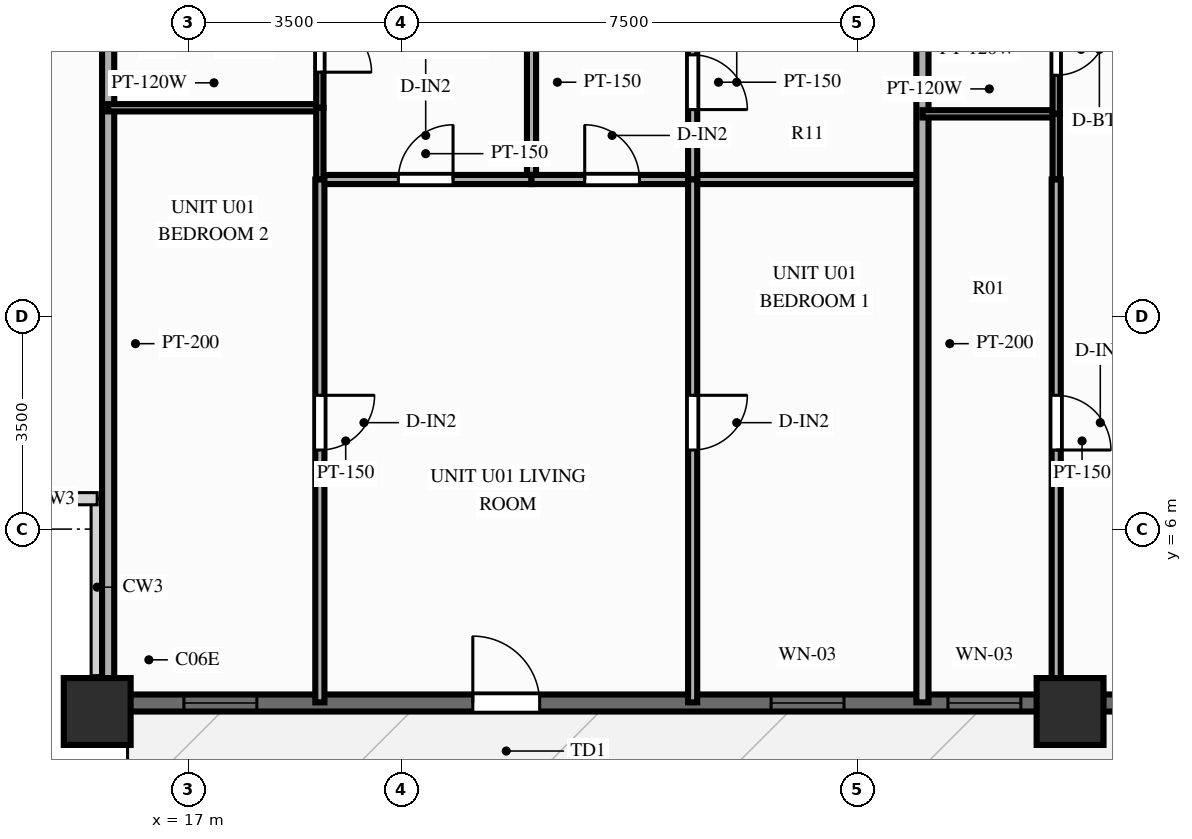
"""IFC4 building model, lengths in metres.
Left out: names, types, materials, properties, quantities, classifications, styles, units other than length and angle.
Written with IfcOpenShell. Run it as: python <this file> out.ifc"""

import sys

from ifc_helpers import new_model, si_unit, direction, frame, frame_2d, origin, origin_2d, place, context, subcontext, project, spatial, rectangle, extrude, source, transform, mapped, element, fill, save


model = new_model("IFC4")
c1 = context("Model", 3, precision=1e-05, world=origin(), true_north=direction((0.0, 1.0)))
c2 = subcontext(c1, "Body", "Model", "MODEL_VIEW")
j1 = project(units=[si_unit("LENGTHUNIT", "METRE"), si_unit("PLANEANGLEUNIT", "RADIAN")], contexts=[c1])
p1 = place(None, origin())
s1 = spatial("IfcSite", under=j1, at=p1, CompositionType="ELEMENT")
p2 = place(p1, origin())
s2 = spatial("IfcBuilding", under=s1, at=p2, CompositionType="ELEMENT")
p3 = place(p2, frame((0.0, 0.0, 61.4)))
s3 = spatial("IfcBuildingStorey", under=s2, at=p3, CompositionType="ELEMENT", Elevation=61.4)
m1 = source(origin(), c2, "Body", "SweptSolid", [
    extrude(rectangle(XDim=1.1, YDim=1.1, at=origin_2d()), origin(), (0.0, 0.0, 1.0), 3.0),
])
for number, where, z_axis, x_axis in (
    (1, (15.5, 3.0, 0.0), (0.0, 0.0, 1.0), (1.0, 0.0, 0.0)),
    (2, (31.5, 3.0, 0.0), (0.0, 0.0, 1.0), (1.0, 0.0, 0.0)),
):
    element("IfcColumn", number, at=place(p3, frame(where, z_axis=z_axis, x_axis=x_axis)), inside=s3, PredefinedType="COLUMN", context=c2, shape_type="MappedRepresentation", body=[
        mapped(m1, transform((0.0, 0.0, 0.0), scale=1.0)),
    ])
p4 = place(p3, frame((15.5, 3.14, 0.0), z_axis=(0.0, 0.0, 1.0), x_axis=(1.0, 0.0, 0.0)))
e3 = element("IfcWall", 3, at=p4, inside=s3, PredefinedType="SOLIDWALL", context=c2, shape_type="SweptSolid", body=[
    extrude(rectangle(XDim=45.0, YDim=0.28, at=frame_2d((22.5, 0.0))), origin(), (0.0, 0.0, 1.0), 2.28),
])
p5 = place(p4, frame((1.426, 0.0, 0.25)))
e4 = element("IfcOpeningElement", 4, at=p5, cuts=e3, PredefinedType="OPENING", context=c2, shape_type="SweptSolid", body=[
    extrude(rectangle(XDim=1.2, YDim=1.5, at=frame_2d((0.6, 0.75))), frame((0.0, 0.152, 0.0), z_axis=(0.0, -1.0, 0.0), x_axis=(1.0, 0.0, 0.0)), (0.0, 0.0, 1.0), 0.304),
])
p6 = place(p4, frame((7.278, 0.0, 0.0), z_axis=(0.0, 0.0, 1.0), x_axis=(-1.0, 0.0, 0.0)))
e5 = element("IfcOpeningElement", 5, at=p6, cuts=e3, PredefinedType="OPENING", context=c2, shape_type="SweptSolid", body=[
    extrude(rectangle(XDim=1.1, YDim=2.15, at=frame_2d((0.55, 1.075))), frame((0.0, 0.152, 0.0), z_axis=(0.0, -1.0, 0.0), x_axis=(1.0, 0.0, 0.0)), (0.0, 0.0, 1.0), 0.304),
])
p7 = place(p4, frame((11.083, 0.0, 0.25)))
e6 = element("IfcOpeningElement", 6, at=p7, cuts=e3, PredefinedType="OPENING", context=c2, shape_type="SweptSolid", body=[
    extrude(rectangle(XDim=1.2, YDim=1.5, at=frame_2d((0.6, 0.75))), frame((0.0, 0.152, 0.0), z_axis=(0.0, -1.0, 0.0), x_axis=(1.0, 0.0, 0.0)), (0.0, 0.0, 1.0), 0.304),
])
p8 = place(p4, frame((13.991, 0.0, 0.25)))
e7 = element("IfcOpeningElement", 7, at=p8, cuts=e3, PredefinedType="OPENING", context=c2, shape_type="SweptSolid", body=[
    extrude(rectangle(XDim=1.2, YDim=1.5, at=frame_2d((0.6, 0.75))), frame((0.0, 0.152, 0.0), z_axis=(0.0, -1.0, 0.0), x_axis=(1.0, 0.0, 0.0)), (0.0, 0.0, 1.0), 0.304),
])
p9 = place(p4, frame((16.858, 0.0, 0.25)))
e8 = element("IfcOpeningElement", 8, at=p9, cuts=e3, PredefinedType="OPENING", context=c2, shape_type="SweptSolid", body=[
    extrude(rectangle(XDim=0.95, YDim=1.5, at=frame_2d((0.475, 0.75))), frame((0.0, 0.152, 0.0), z_axis=(0.0, -1.0, 0.0), x_axis=(1.0, 0.0, 0.0)), (0.0, 0.0, 1.0), 0.304),
])
p10 = place(p4, frame((19.119, 0.0, 0.25)))
e9 = element("IfcOpeningElement", 9, at=p10, cuts=e3, PredefinedType="OPENING", context=c2, shape_type="SweptSolid", body=[
    extrude(rectangle(XDim=1.2, YDim=1.5, at=frame_2d((0.6, 0.75))), frame((0.0, 0.152, 0.0), z_axis=(0.0, -1.0, 0.0), x_axis=(1.0, 0.0, 0.0)), (0.0, 0.0, 1.0), 0.304),
])
p11 = place(p4, frame((21.661, 0.0, 0.25)))
e10 = element("IfcOpeningElement", 10, at=p11, cuts=e3, PredefinedType="OPENING", context=c2, shape_type="SweptSolid", body=[
    extrude(rectangle(XDim=1.2, YDim=1.5, at=frame_2d((0.6, 0.75))), frame((0.0, 0.152, 0.0), z_axis=(0.0, -1.0, 0.0), x_axis=(1.0, 0.0, 0.0)), (0.0, 0.0, 1.0), 0.304),
])
p12 = place(p4, frame((24.013, 0.0, 0.25)))
e11 = element("IfcOpeningElement", 11, at=p12, cuts=e3, PredefinedType="OPENING", context=c2, shape_type="SweptSolid", body=[
    extrude(rectangle(XDim=1.2, YDim=1.5, at=frame_2d((0.6, 0.75))), frame((0.0, 0.152, 0.0), z_axis=(0.0, -1.0, 0.0), x_axis=(1.0, 0.0, 0.0)), (0.0, 0.0, 1.0), 0.304),
])
p13 = place(p4, frame((26.638, 0.0, 0.25)))
e12 = element("IfcOpeningElement", 12, at=p13, cuts=e3, PredefinedType="OPENING", context=c2, shape_type="SweptSolid", body=[
    extrude(rectangle(XDim=1.2, YDim=1.5, at=frame_2d((0.6, 0.75))), frame((0.0, 0.152, 0.0), z_axis=(0.0, -1.0, 0.0), x_axis=(1.0, 0.0, 0.0)), (0.0, 0.0, 1.0), 0.304),
])
p14 = place(p4, frame((29.72, 0.0, 0.25)))
e13 = element("IfcOpeningElement", 13, at=p14, cuts=e3, PredefinedType="OPENING", context=c2, shape_type="SweptSolid", body=[
    extrude(rectangle(XDim=0.95, YDim=1.5, at=frame_2d((0.475, 0.75))), frame((0.0, 0.152, 0.0), z_axis=(0.0, -1.0, 0.0), x_axis=(1.0, 0.0, 0.0)), (0.0, 0.0, 1.0), 0.304),
])
p15 = place(p4, frame((31.765, 0.0, 0.25)))
e14 = element("IfcOpeningElement", 14, at=p15, cuts=e3, PredefinedType="OPENING", context=c2, shape_type="SweptSolid", body=[
    extrude(rectangle(XDim=1.2, YDim=1.5, at=frame_2d((0.6, 0.75))), frame((0.0, 0.152, 0.0), z_axis=(0.0, -1.0, 0.0), x_axis=(1.0, 0.0, 0.0)), (0.0, 0.0, 1.0), 0.304),
])
p16 = place(p4, frame((34.658, 0.0, 0.25)))
e15 = element("IfcOpeningElement", 15, at=p16, cuts=e3, PredefinedType="OPENING", context=c2, shape_type="SweptSolid", body=[
    extrude(rectangle(XDim=1.2, YDim=1.5, at=frame_2d((0.6, 0.75))), frame((0.0, 0.152, 0.0), z_axis=(0.0, -1.0, 0.0), x_axis=(1.0, 0.0, 0.0)), (0.0, 0.0, 1.0), 0.304),
])
p17 = place(p4, frame((37.31, 0.0, 0.25)))
e16 = element("IfcOpeningElement", 16, at=p17, cuts=e3, PredefinedType="OPENING", context=c2, shape_type="SweptSolid", body=[
    extrude(rectangle(XDim=1.2, YDim=1.5, at=frame_2d((0.6, 0.75))), frame((0.0, 0.152, 0.0), z_axis=(0.0, -1.0, 0.0), x_axis=(1.0, 0.0, 0.0)), (0.0, 0.0, 1.0), 0.304),
])
p18 = place(p4, frame((39.801, 0.0, 0.25)))
e17 = element("IfcOpeningElement", 17, at=p18, cuts=e3, PredefinedType="OPENING", context=c2, shape_type="SweptSolid", body=[
    extrude(rectangle(XDim=1.2, YDim=1.5, at=frame_2d((0.6, 0.75))), frame((0.0, 0.152, 0.0), z_axis=(0.0, -1.0, 0.0), x_axis=(1.0, 0.0, 0.0)), (0.0, 0.0, 1.0), 0.304),
])
p19 = place(p4, frame((42.588, 0.0, 0.25)))
e18 = element("IfcOpeningElement", 18, at=p19, cuts=e3, PredefinedType="OPENING", context=c2, shape_type="SweptSolid", body=[
    extrude(rectangle(XDim=1.2, YDim=1.5, at=frame_2d((0.6, 0.75))), frame((0.0, 0.152, 0.0), z_axis=(0.0, -1.0, 0.0), x_axis=(1.0, 0.0, 0.0)), (0.0, 0.0, 1.0), 0.304),
])
p20 = place(p3, frame((15.68, 14.95, 0.0), z_axis=(0.0, 0.0, 1.0), x_axis=(0.0, -1.0, 0.0)))
e19 = element("IfcWall", 19, at=p20, inside=s3, PredefinedType="PARTITIONING", context=c2, shape_type="SweptSolid", body=[
    extrude(rectangle(XDim=11.8, YDim=0.2, at=frame_2d((5.9, 0.0))), origin(), (0.0, 0.0, 1.0), 2.79),
])
p21 = place(p3, frame((22.643, 14.95, 0.0), z_axis=(0.0, 0.0, 1.0), x_axis=(0.0, -1.0, 0.0)))
e20 = element("IfcWall", 20, at=p21, inside=s3, PredefinedType="PARTITIONING", context=c2, shape_type="SweptSolid", body=[
    extrude(rectangle(XDim=3.2, YDim=0.15, at=frame_2d((1.6, 0.0))), origin(), (0.0, 0.0, 1.0), 2.79),
])
p22 = place(p3, frame((19.162, 11.75, 0.0), z_axis=(0.0, 0.0, 1.0), x_axis=(1.0, 0.0, 0.0)))
e21 = element("IfcWall", 21, at=p22, inside=s3, PredefinedType="PARTITIONING", context=c2, shape_type="SweptSolid", body=[
    extrude(rectangle(XDim=3.481, YDim=0.15, at=frame_2d((1.74, 0.0))), origin(), (0.0, 0.0, 1.0), 2.79),
])
p23 = place(p22, frame((1.291, 0.0, 0.0)))
e22 = element("IfcOpeningElement", 22, at=p23, cuts=e21, PredefinedType="OPENING", context=c2, shape_type="SweptSolid", body=[
    extrude(rectangle(XDim=0.9, YDim=2.1, at=frame_2d((0.45, 1.05))), frame((0.0, 0.087, 0.0), z_axis=(0.0, -1.0, 0.0), x_axis=(1.0, 0.0, 0.0)), (0.0, 0.0, 1.0), 0.174),
])
p24 = place(p3, frame((22.643, 11.75, 0.0), z_axis=(0.0, 0.0, 1.0), x_axis=(1.0, 0.0, 0.0)))
e23 = element("IfcWall", 23, at=p24, inside=s3, PredefinedType="PARTITIONING", context=c2, shape_type="SweptSolid", body=[
    extrude(rectangle(XDim=2.65, YDim=0.15, at=frame_2d((1.325, 0.0))), origin(), (0.0, 0.0, 1.0), 2.79),
])
p25 = place(p24, frame((0.875, 0.0, 0.0)))
e24 = element("IfcOpeningElement", 24, at=p25, cuts=e23, PredefinedType="OPENING", context=c2, shape_type="SweptSolid", body=[
    extrude(rectangle(XDim=0.9, YDim=2.1, at=frame_2d((0.45, 1.05))), frame((0.0, 0.087, 0.0), z_axis=(0.0, -1.0, 0.0), x_axis=(1.0, 0.0, 0.0)), (0.0, 0.0, 1.0), 0.174),
])
p26 = place(p3, frame((15.68, 12.93, 0.0), z_axis=(0.0, 0.0, 1.0), x_axis=(1.0, 0.0, 0.0)))
e25 = element("IfcWall", 25, at=p26, inside=s3, PredefinedType="PARTITIONING", context=c2, shape_type="SweptSolid", body=[
    extrude(rectangle(XDim=3.482, YDim=0.12, at=frame_2d((1.741, 0.0))), origin(), (0.0, 0.0, 1.0), 2.79),
])
p27 = place(p3, frame((25.293, 11.75, 0.0), z_axis=(0.0, 0.0, 1.0), x_axis=(1.0, 0.0, 0.0)))
e26 = element("IfcWall", 26, at=p27, inside=s3, PredefinedType="PARTITIONING", context=c2, shape_type="SweptSolid", body=[
    extrude(rectangle(XDim=3.779, YDim=0.15, at=frame_2d((1.89, 0.0))), origin(), (0.0, 0.0, 1.0), 2.79),
])
p28 = place(p3, frame((19.162, 14.95, 0.0), z_axis=(0.0, 0.0, 1.0), x_axis=(0.0, -1.0, 0.0)))
e27 = element("IfcWall", 27, at=p28, inside=s3, PredefinedType="PARTITIONING", context=c2, shape_type="SweptSolid", body=[
    extrude(rectangle(XDim=2.02, YDim=0.12, at=frame_2d((1.01, 0.0))), origin(), (0.0, 0.0, 1.0), 2.79),
])
p29 = place(p28, frame((0.585, 0.0, 0.0)))
e28 = element("IfcOpeningElement", 28, at=p29, cuts=e27, PredefinedType="OPENING", context=c2, shape_type="SweptSolid", body=[
    extrude(rectangle(XDim=0.85, YDim=2.05, at=frame_2d((0.425, 1.025))), frame((0.0, 0.072, 0.0), z_axis=(0.0, -1.0, 0.0), x_axis=(1.0, 0.0, 0.0)), (0.0, 0.0, 1.0), 0.144),
])
p30 = place(p3, frame((19.162, 12.93, 0.0), z_axis=(0.0, 0.0, 1.0), x_axis=(0.0, -1.0, 0.0)))
e29 = element("IfcWall", 29, at=p30, inside=s3, PredefinedType="PARTITIONING", context=c2, shape_type="SweptSolid", body=[
    extrude(rectangle(XDim=1.18, YDim=0.12, at=frame_2d((0.59, 0.0))), origin(), (0.0, 0.0, 1.0), 2.79),
])
p31 = place(p3, frame((19.162, 11.75, 0.0), z_axis=(0.0, 0.0, 1.0), x_axis=(0.0, -1.0, 0.0)))
e30 = element("IfcWall", 30, at=p31, inside=s3, PredefinedType="PARTITIONING", context=c2, shape_type="SweptSolid", body=[
    extrude(rectangle(XDim=8.6, YDim=0.15, at=frame_2d((4.3, 0.0))), origin(), (0.0, 0.0, 1.0), 2.79),
])
p32 = place(p31, frame((3.549, 0.0, 0.0)))
e31 = element("IfcOpeningElement", 31, at=p32, cuts=e30, PredefinedType="OPENING", context=c2, shape_type="SweptSolid", body=[
    extrude(rectangle(XDim=0.9, YDim=2.1, at=frame_2d((0.45, 1.05))), frame((0.0, 0.087, 0.0), z_axis=(0.0, -1.0, 0.0), x_axis=(1.0, 0.0, 0.0)), (0.0, 0.0, 1.0), 0.174),
])
p33 = place(p3, frame((25.293, 14.95, 0.0), z_axis=(0.0, 0.0, 1.0), x_axis=(0.0, -1.0, 0.0)))
e32 = element("IfcWall", 32, at=p33, inside=s3, PredefinedType="PARTITIONING", context=c2, shape_type="SweptSolid", body=[
    extrude(rectangle(XDim=3.2, YDim=0.15, at=frame_2d((1.6, 0.0))), origin(), (0.0, 0.0, 1.0), 2.79),
])
p34 = place(p33, frame((1.15, 0.0, 0.0)))
e33 = element("IfcOpeningElement", 33, at=p34, cuts=e32, PredefinedType="OPENING", context=c2, shape_type="SweptSolid", body=[
    extrude(rectangle(XDim=0.9, YDim=2.1, at=frame_2d((0.45, 1.05))), frame((0.0, 0.087, 0.0), z_axis=(0.0, -1.0, 0.0), x_axis=(1.0, 0.0, 0.0)), (0.0, 0.0, 1.0), 0.174),
])
p35 = place(p3, frame((25.293, 11.75, 0.0), z_axis=(0.0, 0.0, 1.0), x_axis=(0.0, -1.0, 0.0)))
e34 = element("IfcWall", 34, at=p35, inside=s3, PredefinedType="PARTITIONING", context=c2, shape_type="SweptSolid", body=[
    extrude(rectangle(XDim=8.6, YDim=0.15, at=frame_2d((4.3, 0.0))), origin(), (0.0, 0.0, 1.0), 2.79),
])
p36 = place(p35, frame((3.549, 0.0, 0.0)))
e35 = element("IfcOpeningElement", 35, at=p36, cuts=e34, PredefinedType="OPENING", context=c2, shape_type="SweptSolid", body=[
    extrude(rectangle(XDim=0.9, YDim=2.1, at=frame_2d((0.45, 1.05))), frame((0.0, 0.087, 0.0), z_axis=(0.0, -1.0, 0.0), x_axis=(1.0, 0.0, 0.0)), (0.0, 0.0, 1.0), 0.174),
])
p37 = place(p3, frame((29.072, 14.95, 0.0), z_axis=(0.0, 0.0, 1.0), x_axis=(0.0, -1.0, 0.0)))
e36 = element("IfcWall", 36, at=p37, inside=s3, PredefinedType="PARTITIONING", context=c2, shape_type="SweptSolid", body=[
    extrude(rectangle(XDim=11.8, YDim=0.2, at=frame_2d((5.9, 0.0))), origin(), (0.0, 0.0, 1.0), 2.79),
])
p38 = place(p3, frame((29.072, 12.83, 0.0), z_axis=(0.0, 0.0, 1.0), x_axis=(1.0, 0.0, 0.0)))
e37 = element("IfcWall", 37, at=p38, inside=s3, PredefinedType="PARTITIONING", context=c2, shape_type="SweptSolid", body=[
    extrude(rectangle(XDim=2.2, YDim=0.12, at=frame_2d((1.1, 0.0))), origin(), (0.0, 0.0, 1.0), 2.79),
])
p39 = place(p3, frame((31.272, 14.95, 0.0), z_axis=(0.0, 0.0, 1.0), x_axis=(0.0, -1.0, 0.0)))
e38 = element("IfcWall", 38, at=p39, inside=s3, PredefinedType="PARTITIONING", context=c2, shape_type="SweptSolid", body=[
    extrude(rectangle(XDim=2.12, YDim=0.12, at=frame_2d((1.06, 0.0))), origin(), (0.0, 0.0, 1.0), 2.24),
])
p40 = place(p39, frame((0.635, 0.0, 0.0)))
e39 = element("IfcOpeningElement", 39, at=p40, cuts=e38, PredefinedType="OPENING", context=c2, shape_type="SweptSolid", body=[
    extrude(rectangle(XDim=0.85, YDim=2.05, at=frame_2d((0.425, 1.025))), frame((0.0, 0.072, 0.0), z_axis=(0.0, -1.0, 0.0), x_axis=(1.0, 0.0, 0.0)), (0.0, 0.0, 1.0), 0.144),
])
p41 = place(p3, frame((31.272, 12.83, 0.0), z_axis=(0.0, 0.0, 1.0), x_axis=(0.0, -1.0, 0.0)))
e40 = element("IfcWall", 40, at=p41, inside=s3, PredefinedType="PARTITIONING", context=c2, shape_type="SweptSolid", body=[
    extrude(rectangle(XDim=1.08, YDim=0.12, at=frame_2d((0.54, 0.0))), origin(), (0.0, 0.0, 1.0), 2.24),
])
p42 = place(p3, frame((31.272, 11.75, 0.0), z_axis=(0.0, 0.0, 1.0), x_axis=(0.0, -1.0, 0.0)))
e41 = element("IfcWall", 41, at=p42, inside=s3, PredefinedType="PARTITIONING", context=c2, shape_type="SweptSolid", body=[
    extrude(rectangle(XDim=8.6, YDim=0.15, at=frame_2d((4.3, 0.0))), origin(), (0.0, 0.0, 1.0), 2.24),
])
p43 = place(p42, frame((3.549, 0.0, 0.0)))
e42 = element("IfcOpeningElement", 42, at=p43, cuts=e41, PredefinedType="OPENING", context=c2, shape_type="SweptSolid", body=[
    extrude(rectangle(XDim=0.9, YDim=2.1, at=frame_2d((0.45, 1.05))), frame((0.0, 0.087, 0.0), z_axis=(0.0, -1.0, 0.0), x_axis=(1.0, 0.0, 0.0)), (0.0, 0.0, 1.0), 0.174),
])
m2 = source(origin(), c2, "Body", "SweptSolid", [
    extrude(rectangle(XDim=1.2, YDim=1.5, at=frame_2d((0.6, 0.75))), frame((0.0, 0.03, 0.0), z_axis=(0.0, -1.0, 0.0), x_axis=(1.0, 0.0, 0.0)), (0.0, 0.0, 1.0), 0.06),
])
p44 = place(p5, origin())
e43 = element("IfcWindow", 43, at=p44, inside=s3, PartitioningType="SINGLE_PANEL", PredefinedType="WINDOW", context=c2, shape_type="MappedRepresentation", body=[
    mapped(m2, transform((0.0, 0.0, 0.0), scale=1.0)),
])
fill(e4, e43)
m3 = source(origin(), c2, "Body", "SweptSolid", [
    extrude(rectangle(XDim=1.1, YDim=2.15, at=frame_2d((0.55, 1.075))), frame((0.0, 0.025, 0.0), z_axis=(0.0, -1.0, 0.0), x_axis=(1.0, 0.0, 0.0)), (0.0, 0.0, 1.0), 0.05),
])
p45 = place(p6, origin())
e44 = element("IfcDoor", 44, at=p45, inside=s3, OperationType="SINGLE_SWING_RIGHT", PredefinedType="DOOR", context=c2, shape_type="MappedRepresentation", body=[
    mapped(m3, transform((0.0, 0.0, 0.0), scale=1.0)),
])
fill(e5, e44)
p46 = place(p7, origin())
e45 = element("IfcWindow", 45, at=p46, inside=s3, PartitioningType="SINGLE_PANEL", PredefinedType="WINDOW", context=c2, shape_type="MappedRepresentation", body=[
    mapped(m2, transform((0.0, 0.0, 0.0), scale=1.0)),
])
fill(e6, e45)
p47 = place(p8, origin())
e46 = element("IfcWindow", 46, at=p47, inside=s3, PartitioningType="SINGLE_PANEL", PredefinedType="WINDOW", context=c2, shape_type="MappedRepresentation", body=[
    mapped(m2, transform((0.0, 0.0, 0.0), scale=1.0)),
])
fill(e7, e46)
m4 = source(origin(), c2, "Body", "SweptSolid", [
    extrude(rectangle(XDim=0.9, YDim=2.1, at=frame_2d((0.45, 1.05))), frame((0.0, 0.025, 0.0), z_axis=(0.0, -1.0, 0.0), x_axis=(1.0, 0.0, 0.0)), (0.0, 0.0, 1.0), 0.05),
])
p48 = place(p23, origin())
e47 = element("IfcDoor", 47, at=p48, inside=s3, OperationType="SINGLE_SWING_RIGHT", PredefinedType="DOOR", context=c2, shape_type="MappedRepresentation", body=[
    mapped(m4, transform((0.0, 0.0, 0.0), scale=1.0)),
])
fill(e22, e47)
p49 = place(p25, origin())
e48 = element("IfcDoor", 48, at=p49, inside=s3, OperationType="SINGLE_SWING_LEFT", PredefinedType="DOOR", context=c2, shape_type="MappedRepresentation", body=[
    mapped(m4, transform((0.0, 0.0, 0.0), scale=1.0)),
])
fill(e24, e48)
m5 = source(origin(), c2, "Body", "SweptSolid", [
    extrude(rectangle(XDim=0.85, YDim=2.05, at=frame_2d((0.425, 1.025))), frame((0.0, 0.025, 0.0), z_axis=(0.0, -1.0, 0.0), x_axis=(1.0, 0.0, 0.0)), (0.0, 0.0, 1.0), 0.05),
])
p50 = place(p29, origin())
e49 = element("IfcDoor", 49, at=p50, inside=s3, OperationType="SINGLE_SWING_RIGHT", PredefinedType="DOOR", context=c2, shape_type="MappedRepresentation", body=[
    mapped(m5, transform((0.0, 0.0, 0.0), scale=1.0)),
])
fill(e28, e49)
p51 = place(p32, origin())
e50 = element("IfcDoor", 50, at=p51, inside=s3, OperationType="SINGLE_SWING_LEFT", PredefinedType="DOOR", context=c2, shape_type="MappedRepresentation", body=[
    mapped(m4, transform((0.0, 0.0, 0.0), scale=1.0)),
])
fill(e31, e50)
p52 = place(p34, origin())
e51 = element("IfcDoor", 51, at=p52, inside=s3, OperationType="SINGLE_SWING_RIGHT", PredefinedType="DOOR", context=c2, shape_type="MappedRepresentation", body=[
    mapped(m4, transform((0.0, 0.0, 0.0), scale=1.0)),
])
fill(e33, e51)
p53 = place(p36, origin())
e52 = element("IfcDoor", 52, at=p53, inside=s3, OperationType="SINGLE_SWING_LEFT", PredefinedType="DOOR", context=c2, shape_type="MappedRepresentation", body=[
    mapped(m4, transform((0.0, 0.0, 0.0), scale=1.0)),
])
fill(e35, e52)
p54 = place(p40, origin())
e53 = element("IfcDoor", 53, at=p54, inside=s3, OperationType="SINGLE_SWING_LEFT", PredefinedType="DOOR", context=c2, shape_type="MappedRepresentation", body=[
    mapped(m5, transform((0.0, 0.0, 0.0), scale=1.0)),
])
fill(e39, e53)
p55 = place(p43, origin())
e54 = element("IfcDoor", 54, at=p55, inside=s3, OperationType="SINGLE_SWING_RIGHT", PredefinedType="DOOR", context=c2, shape_type="MappedRepresentation", body=[
    mapped(m4, transform((0.0, 0.0, 0.0), scale=1.0)),
])
fill(e42, e54)
save(model, sys.argv[1])
